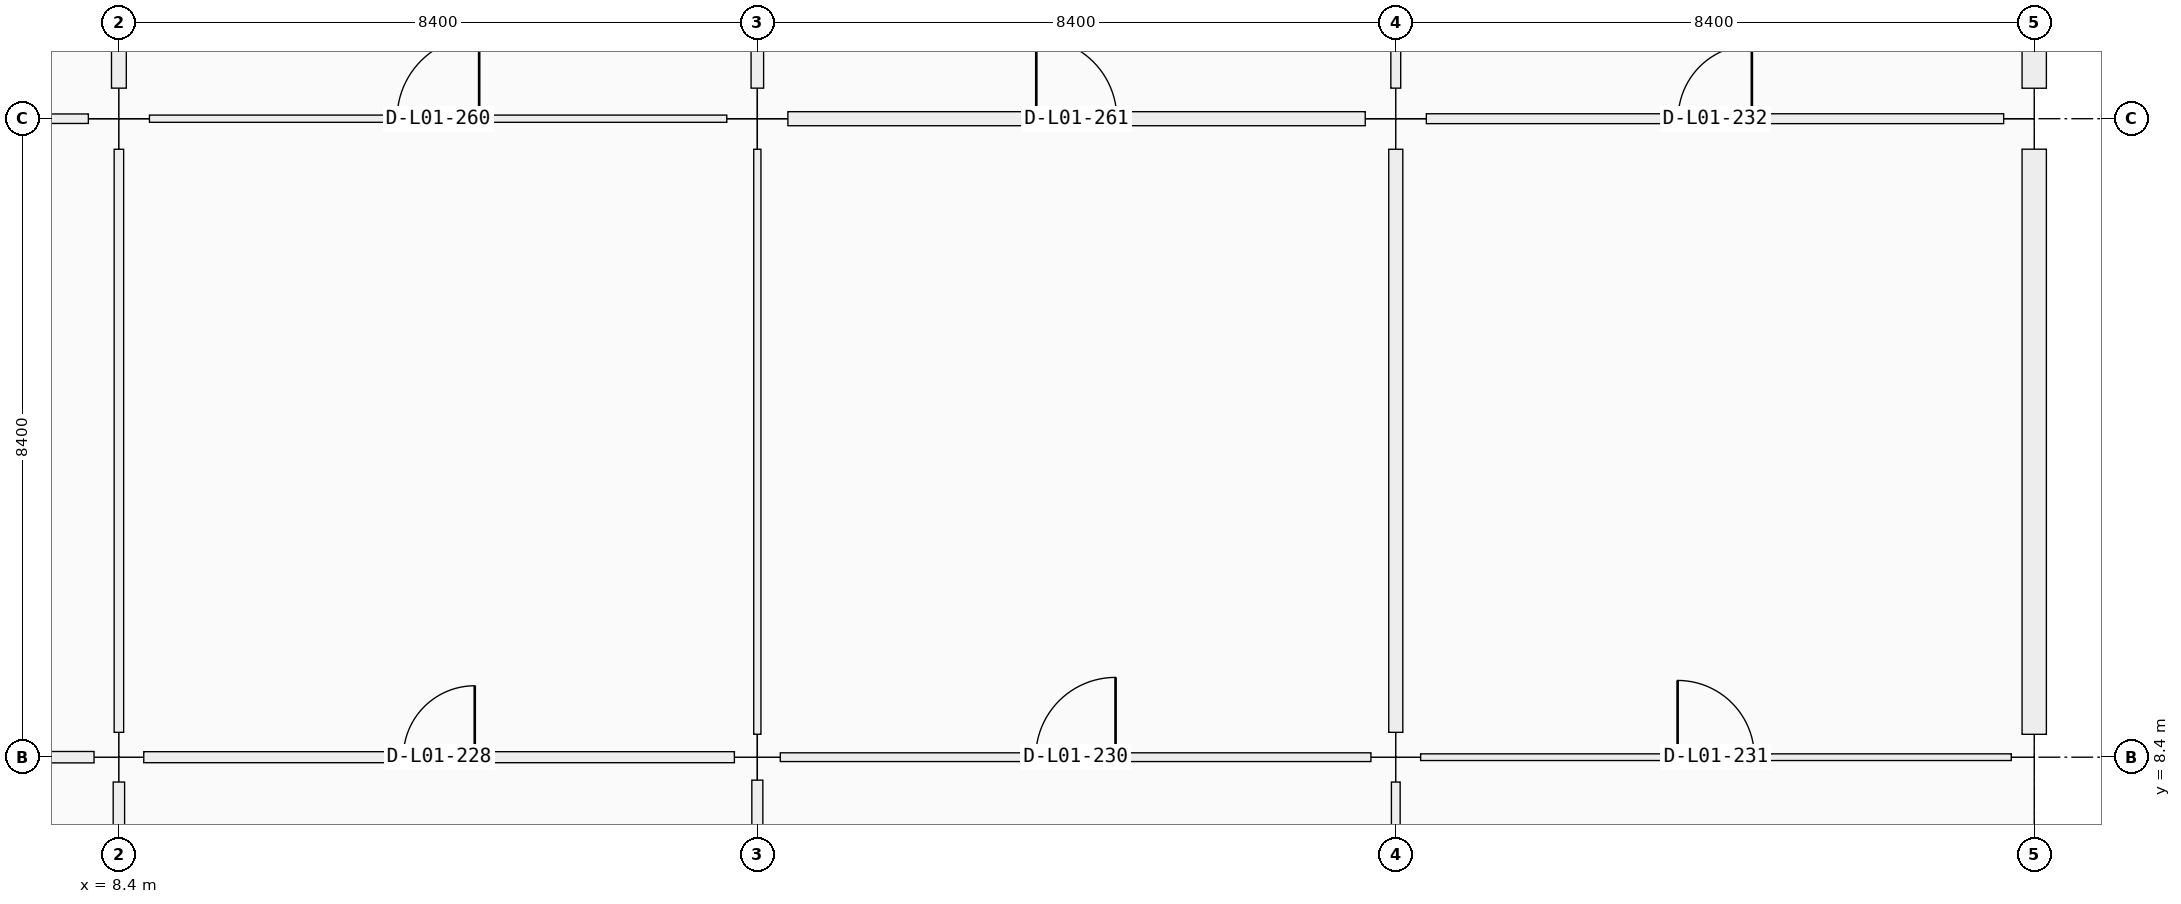
"""IFC4 building model, lengths in metres.
Left out: names, types, materials, properties, quantities, classifications, styles, units other than length and angle.
Written with IfcOpenShell. Run it as: python <this file> out.ifc"""

import sys

from ifc_helpers import new_model, si_unit, direction, frame, frame_2d, origin, origin_2d, place, context, subcontext, project, spatial, rectangle, extrude, element, fill, save


model = new_model("IFC4")
c1 = context("Model", 3, precision=1e-05, world=origin(), true_north=direction((0.0, 1.0)))
c2 = subcontext(c1, "Body", "Model", "MODEL_VIEW")
j1 = project(units=[si_unit("LENGTHUNIT", "METRE"), si_unit("PLANEANGLEUNIT", "RADIAN")], contexts=[c1])
p1 = place(None, origin())
s1 = spatial("IfcSite", under=j1, at=p1, CompositionType="ELEMENT")
p2 = place(p1, origin())
s2 = spatial("IfcBuilding", under=s1, at=p2, CompositionType="ELEMENT")
p3 = place(p2, frame((0.0, 0.0, 5.76)))
s3 = spatial("IfcBuildingStorey", under=s2, at=p3, CompositionType="ELEMENT", Elevation=5.76)
p4 = place(p3, frame((8.4, 8.4, 0.0), z_axis=(0.0, 0.0, 1.0), x_axis=(1.0, 0.0, 0.0)))
e1 = element("IfcColumn", 1, at=p4, inside=s3, PredefinedType="COLUMN", context=c2, shape_type="SweptSolid", body=[
    extrude(rectangle(XDim=0.65, YDim=0.65, at=origin_2d()), origin(), (0.0, 0.0, 1.0), 4.5),
])
p5 = place(p3, frame((8.4, 16.8, 0.0), z_axis=(0.0, 0.0, 1.0), x_axis=(1.0, 0.0, 0.0)))
e2 = element("IfcColumn", 2, at=p5, inside=s3, PredefinedType="COLUMN", context=c2, shape_type="SweptSolid", body=[
    extrude(rectangle(XDim=0.8, YDim=0.8, at=origin_2d()), origin(), (0.0, 0.0, 1.0), 4.5),
])
p6 = place(p3, frame((16.8, 8.4, 0.0), z_axis=(0.0, 0.0, 1.0), x_axis=(1.0, 0.0, 0.0)))
e3 = element("IfcColumn", 3, at=p6, inside=s3, PredefinedType="COLUMN", context=c2, shape_type="SweptSolid", body=[
    extrude(rectangle(XDim=0.6, YDim=0.6, at=origin_2d()), origin(), (0.0, 0.0, 1.0), 4.5),
])
p7 = place(p3, frame((16.8, 16.8, 0.0), z_axis=(0.0, 0.0, 1.0), x_axis=(1.0, 0.0, 0.0)))
e4 = element("IfcColumn", 4, at=p7, inside=s3, PredefinedType="COLUMN", context=c2, shape_type="SweptSolid", body=[
    extrude(rectangle(XDim=0.8, YDim=0.8, at=origin_2d()), origin(), (0.0, 0.0, 1.0), 4.5),
])
p8 = place(p3, frame((25.2, 8.4, 0.0), z_axis=(0.0, 0.0, 1.0), x_axis=(1.0, 0.0, 0.0)))
e5 = element("IfcColumn", 5, at=p8, inside=s3, PredefinedType="COLUMN", context=c2, shape_type="SweptSolid", body=[
    extrude(rectangle(XDim=0.65, YDim=0.65, at=origin_2d()), origin(), (0.0, 0.0, 1.0), 4.5),
])
p9 = place(p3, frame((25.2, 16.8, 0.0), z_axis=(0.0, 0.0, 1.0), x_axis=(1.0, 0.0, 0.0)))
e6 = element("IfcColumn", 6, at=p9, inside=s3, PredefinedType="COLUMN", context=c2, shape_type="SweptSolid", body=[
    extrude(rectangle(XDim=0.8, YDim=0.8, at=origin_2d()), origin(), (0.0, 0.0, 1.0), 4.5),
])
p10 = place(p3, frame((33.6, 8.4, 0.0), z_axis=(0.0, 0.0, 1.0), x_axis=(1.0, 0.0, 0.0)))
e7 = element("IfcColumn", 7, at=p10, inside=s3, PredefinedType="COLUMN", context=c2, shape_type="SweptSolid", body=[
    extrude(rectangle(XDim=0.6, YDim=0.6, at=origin_2d()), origin(), (0.0, 0.0, 1.0), 4.5),
])
p11 = place(p3, frame((33.6, 16.8, 0.0), z_axis=(0.0, 0.0, 1.0), x_axis=(1.0, 0.0, 0.0)))
e8 = element("IfcColumn", 8, at=p11, inside=s3, PredefinedType="COLUMN", context=c2, shape_type="SweptSolid", body=[
    extrude(rectangle(XDim=0.8, YDim=0.8, at=origin_2d()), origin(), (0.0, 0.0, 1.0), 4.5),
])
p12 = place(p3, frame((33.6, 16.399, 0.0), z_axis=(0.0, 0.0, 1.0), x_axis=(0.0, -1.0, 0.0)))
e9 = element("IfcWall", 9, at=p12, inside=s3, PredefinedType="SOLIDWALL", context=c2, shape_type="SweptSolid", body=[
    extrude(rectangle(XDim=7.698, YDim=0.32, at=frame_2d((3.849, 0.0))), origin(), (0.0, 0.0, 1.0), 3.4),
])
p13 = place(p12, frame((2.699, 0.0, 0.9)))
e10 = element("IfcOpeningElement", 10, at=p13, cuts=e9, PredefinedType="OPENING", context=c2, shape_type="SweptSolid", body=[
    extrude(rectangle(XDim=2.3, YDim=1.85, at=frame_2d((1.15, 0.925))), frame((0.0, 0.16, 0.0), z_axis=(0.0, -1.0, 0.0), x_axis=(1.0, 0.0, 0.0)), (0.0, 0.0, 1.0), 0.32),
])
p14 = place(p3, frame((33.6, 24.799, 0.0), z_axis=(0.0, 0.0, 1.0), x_axis=(0.0, -1.0, 0.0)))
e11 = element("IfcWall", 11, at=p14, inside=s3, PredefinedType="SOLIDWALL", context=c2, shape_type="SweptSolid", body=[
    extrude(rectangle(XDim=7.598, YDim=0.32, at=frame_2d((3.799, 0.0))), origin(), (0.0, 0.0, 1.0), 3.4),
])
p15 = place(p14, frame((2.349, 0.0, 0.9)))
e12 = element("IfcOpeningElement", 12, at=p15, cuts=e11, PredefinedType="OPENING", context=c2, shape_type="SweptSolid", body=[
    extrude(rectangle(XDim=2.9, YDim=1.85, at=frame_2d((1.45, 0.925))), frame((0.0, 0.16, 0.0), z_axis=(0.0, -1.0, 0.0), x_axis=(1.0, 0.0, 0.0)), (0.0, 0.0, 1.0), 0.32),
])
p16 = place(p3, frame((0.277, 8.4, 0.0), z_axis=(0.0, 0.0, 1.0), x_axis=(1.0, 0.0, 0.0)))
e13 = element("IfcWall", 13, at=p16, inside=s3, PredefinedType="MOVABLE", context=c2, shape_type="SweptSolid", body=[
    extrude(rectangle(XDim=7.796, YDim=0.15, at=frame_2d((3.898, 0.0))), origin(), (0.0, 0.0, 1.0), 2.4),
])
p17 = place(p16, frame((3.358, 0.0, 0.0)))
e14 = element("IfcOpeningElement", 14, at=p17, cuts=e13, PredefinedType="OPENING", context=c2, shape_type="SweptSolid", body=[
    extrude(rectangle(XDim=1.08, YDim=2.22, at=frame_2d((0.54, 1.11))), frame((0.0, 0.075, 0.0), z_axis=(0.0, -1.0, 0.0), x_axis=(1.0, 0.0, 0.0)), (0.0, 0.0, 1.0), 0.15),
])
p18 = place(p3, frame((0.277, 16.8, 0.0), z_axis=(0.0, 0.0, 1.0), x_axis=(1.0, 0.0, 0.0)))
e15 = element("IfcWall", 15, at=p18, inside=s3, PredefinedType="PARTITIONING", context=c2, shape_type="SweptSolid", body=[
    extrude(rectangle(XDim=7.721, YDim=0.125, at=frame_2d((3.86, 0.0))), origin(), (0.0, 0.0, 1.0), 2.4),
])
p19 = place(p18, frame((3.33, 0.0, 0.0)))
e16 = element("IfcOpeningElement", 16, at=p19, cuts=e15, PredefinedType="OPENING", context=c2, shape_type="SweptSolid", body=[
    extrude(rectangle(XDim=1.06, YDim=2.22, at=frame_2d((0.53, 1.11))), frame((0.0, 0.062, 0.0), z_axis=(0.0, -1.0, 0.0), x_axis=(1.0, 0.0, 0.0)), (0.0, 0.0, 1.0), 0.125),
])
p20 = place(p3, frame((8.727, 8.4, 0.0), z_axis=(0.0, 0.0, 1.0), x_axis=(1.0, 0.0, 0.0)))
e17 = element("IfcWall", 17, at=p20, inside=s3, PredefinedType="PARTITIONING", context=c2, shape_type="SweptSolid", body=[
    extrude(rectangle(XDim=7.771, YDim=0.145, at=frame_2d((3.885, 0.0))), origin(), (0.0, 0.0, 1.0), 2.4),
])
p21 = place(p20, frame((3.415, 0.0, 0.0)))
e18 = element("IfcOpeningElement", 18, at=p21, cuts=e17, PredefinedType="OPENING", context=c2, shape_type="SweptSolid", body=[
    extrude(rectangle(XDim=0.94, YDim=2.15, at=frame_2d((0.47, 1.075))), frame((0.0, 0.073, 0.0), z_axis=(0.0, -1.0, 0.0), x_axis=(1.0, 0.0, 0.0)), (0.0, 0.0, 1.0), 0.145),
])
p22 = place(p3, frame((8.802, 16.8, 0.0), z_axis=(0.0, 0.0, 1.0), x_axis=(1.0, 0.0, 0.0)))
e19 = element("IfcWall", 19, at=p22, inside=s3, PredefinedType="PARTITIONING", context=c2, shape_type="SweptSolid", body=[
    extrude(rectangle(XDim=7.596, YDim=0.095, at=frame_2d((3.798, 0.0))), origin(), (0.0, 0.0, 1.0), 2.4),
])
p23 = place(p22, frame((3.258, 0.0, 0.0)))
e20 = element("IfcOpeningElement", 20, at=p23, cuts=e19, PredefinedType="OPENING", context=c2, shape_type="SweptSolid", body=[
    extrude(rectangle(XDim=1.08, YDim=2.22, at=frame_2d((0.54, 1.11))), frame((0.0, 0.047, 0.0), z_axis=(0.0, -1.0, 0.0), x_axis=(1.0, 0.0, 0.0)), (0.0, 0.0, 1.0), 0.095),
])
p24 = place(p3, frame((17.102, 8.4, 0.0), z_axis=(0.0, 0.0, 1.0), x_axis=(1.0, 0.0, 0.0)))
e21 = element("IfcWall", 21, at=p24, inside=s3, PredefinedType="PARTITIONING", context=c2, shape_type="SweptSolid", body=[
    extrude(rectangle(XDim=7.771, YDim=0.115, at=frame_2d((3.885, 0.0))), origin(), (0.0, 0.0, 1.0), 2.4),
])
p25 = place(p24, frame((3.361, 0.0, 0.0)))
e22 = element("IfcOpeningElement", 22, at=p25, cuts=e21, PredefinedType="OPENING", context=c2, shape_type="SweptSolid", body=[
    extrude(rectangle(XDim=1.05, YDim=2.12, at=frame_2d((0.525, 1.06))), frame((0.0, 0.058, 0.0), z_axis=(0.0, -1.0, 0.0), x_axis=(1.0, 0.0, 0.0)), (0.0, 0.0, 1.0), 0.115),
])
p26 = place(p3, frame((17.202, 16.8, 0.0), z_axis=(0.0, 0.0, 1.0), x_axis=(1.0, 0.0, 0.0)))
e23 = element("IfcWall", 23, at=p26, inside=s3, PredefinedType="PARTITIONING", context=c2, shape_type="SweptSolid", body=[
    extrude(rectangle(XDim=7.596, YDim=0.185, at=frame_2d((3.798, 0.0))), origin(), (0.0, 0.0, 1.0), 2.4),
])
p27 = place(p26, frame((3.268, 0.0, 0.0)))
e24 = element("IfcOpeningElement", 24, at=p27, cuts=e23, PredefinedType="OPENING", context=c2, shape_type="SweptSolid", body=[
    extrude(rectangle(XDim=1.06, YDim=2.22, at=frame_2d((0.53, 1.11))), frame((0.0, 0.093, 0.0), z_axis=(0.0, -1.0, 0.0), x_axis=(1.0, 0.0, 0.0)), (0.0, 0.0, 1.0), 0.185),
])
p28 = place(p3, frame((25.527, 8.4, 0.0), z_axis=(0.0, 0.0, 1.0), x_axis=(1.0, 0.0, 0.0)))
e25 = element("IfcWall", 25, at=p28, inside=s3, PredefinedType="PARTITIONING", context=c2, shape_type="SweptSolid", body=[
    extrude(rectangle(XDim=7.771, YDim=0.088, at=frame_2d((3.885, 0.0))), origin(), (0.0, 0.0, 1.0), 2.4),
])
p29 = place(p28, frame((3.381, 0.0, 0.0)))
e26 = element("IfcOpeningElement", 26, at=p29, cuts=e25, PredefinedType="OPENING", context=c2, shape_type="SweptSolid", body=[
    extrude(rectangle(XDim=1.01, YDim=2.12, at=frame_2d((0.505, 1.06))), frame((0.0, 0.044, 0.0), z_axis=(0.0, -1.0, 0.0), x_axis=(1.0, 0.0, 0.0)), (0.0, 0.0, 1.0), 0.088),
])
p30 = place(p3, frame((25.602, 16.8, 0.0), z_axis=(0.0, 0.0, 1.0), x_axis=(1.0, 0.0, 0.0)))
e27 = element("IfcWall", 27, at=p30, inside=s3, PredefinedType="MOVABLE", context=c2, shape_type="SweptSolid", body=[
    extrude(rectangle(XDim=7.596, YDim=0.13, at=frame_2d((3.798, 0.0))), origin(), (0.0, 0.0, 1.0), 2.4),
])
p31 = place(p30, frame((3.313, 0.0, 0.0)))
e28 = element("IfcOpeningElement", 28, at=p31, cuts=e27, PredefinedType="OPENING", context=c2, shape_type="SweptSolid", body=[
    extrude(rectangle(XDim=0.97, YDim=2.12, at=frame_2d((0.485, 1.06))), frame((0.0, 0.065, 0.0), z_axis=(0.0, -1.0, 0.0), x_axis=(1.0, 0.0, 0.0)), (0.0, 0.0, 1.0), 0.13),
])
p32 = place(p3, frame((8.4, 0.277, 0.0), z_axis=(0.0, 0.0, 1.0), x_axis=(0.0, 1.0, 0.0)))
e29 = element("IfcWall", 29, at=p32, inside=s3, PredefinedType="MOVABLE", context=c2, shape_type="SweptSolid", body=[
    extrude(rectangle(XDim=7.796, YDim=0.15, at=frame_2d((3.898, 0.0))), origin(), (0.0, 0.0, 1.0), 2.4),
])
p33 = place(p32, frame((3.388, 0.0, 0.0)))
e30 = element("IfcOpeningElement", 30, at=p33, cuts=e29, PredefinedType="OPENING", context=c2, shape_type="SweptSolid", body=[
    extrude(rectangle(XDim=1.02, YDim=2.2, at=frame_2d((0.51, 1.1))), frame((0.0, 0.075, 0.0), z_axis=(0.0, -1.0, 0.0), x_axis=(1.0, 0.0, 0.0)), (0.0, 0.0, 1.0), 0.15),
])
p34 = place(p3, frame((8.4, 8.727, 0.0), z_axis=(0.0, 0.0, 1.0), x_axis=(0.0, 1.0, 0.0)))
e31 = element("IfcWall", 31, at=p34, inside=s3, PredefinedType="PARTITIONING", context=c2, shape_type="SweptSolid", body=[
    extrude(rectangle(XDim=7.671, YDim=0.125, at=frame_2d((3.835, 0.0))), origin(), (0.0, 0.0, 1.0), 2.4),
])
p35 = place(p34, frame((3.336, 0.0, 0.0)))
e32 = element("IfcOpeningElement", 32, at=p35, cuts=e31, PredefinedType="OPENING", context=c2, shape_type="SweptSolid", body=[
    extrude(rectangle(XDim=1.0, YDim=2.2, at=frame_2d((0.5, 1.1))), frame((0.0, 0.062, 0.0), z_axis=(0.0, -1.0, 0.0), x_axis=(1.0, 0.0, 0.0)), (0.0, 0.0, 1.0), 0.125),
])
p36 = place(p3, frame((8.4, 17.202, 0.0), z_axis=(0.0, 0.0, 1.0), x_axis=(0.0, 1.0, 0.0)))
e33 = element("IfcWall", 33, at=p36, inside=s3, PredefinedType="PARTITIONING", context=c2, shape_type="SweptSolid", body=[
    extrude(rectangle(XDim=7.596, YDim=0.195, at=frame_2d((3.798, 0.0))), origin(), (0.0, 0.0, 1.0), 2.4),
])
p37 = place(p36, frame((3.308, 0.0, 0.0)))
e34 = element("IfcOpeningElement", 34, at=p37, cuts=e33, PredefinedType="OPENING", context=c2, shape_type="SweptSolid", body=[
    extrude(rectangle(XDim=0.98, YDim=2.18, at=frame_2d((0.49, 1.09))), frame((0.0, 0.098, 0.0), z_axis=(0.0, -1.0, 0.0), x_axis=(1.0, 0.0, 0.0)), (0.0, 0.0, 1.0), 0.195),
])
p38 = place(p3, frame((16.8, 0.277, 0.0), z_axis=(0.0, 0.0, 1.0), x_axis=(0.0, 1.0, 0.0)))
e35 = element("IfcWall", 35, at=p38, inside=s3, PredefinedType="PARTITIONING", context=c2, shape_type="SweptSolid", body=[
    extrude(rectangle(XDim=7.821, YDim=0.145, at=frame_2d((3.91, 0.0))), origin(), (0.0, 0.0, 1.0), 2.4),
])
p39 = place(p38, frame((3.45, 0.0, 0.0)))
e36 = element("IfcOpeningElement", 36, at=p39, cuts=e35, PredefinedType="OPENING", context=c2, shape_type="SweptSolid", body=[
    extrude(rectangle(XDim=0.92, YDim=2.15, at=frame_2d((0.46, 1.075))), frame((0.0, 0.073, 0.0), z_axis=(0.0, -1.0, 0.0), x_axis=(1.0, 0.0, 0.0)), (0.0, 0.0, 1.0), 0.145),
])
p40 = place(p3, frame((16.8, 8.702, 0.0), z_axis=(0.0, 0.0, 1.0), x_axis=(0.0, 1.0, 0.0)))
e37 = element("IfcWall", 37, at=p40, inside=s3, PredefinedType="PARTITIONING", context=c2, shape_type="SweptSolid", body=[
    extrude(rectangle(XDim=7.696, YDim=0.095, at=frame_2d((3.848, 0.0))), origin(), (0.0, 0.0, 1.0), 2.4),
])
p41 = place(p40, frame((3.323, 0.0, 0.0)))
e38 = element("IfcOpeningElement", 38, at=p41, cuts=e37, PredefinedType="OPENING", context=c2, shape_type="SweptSolid", body=[
    extrude(rectangle(XDim=1.05, YDim=2.12, at=frame_2d((0.525, 1.06))), frame((0.0, 0.047, 0.0), z_axis=(0.0, -1.0, 0.0), x_axis=(1.0, 0.0, 0.0)), (0.0, 0.0, 1.0), 0.095),
])
p42 = place(p3, frame((16.8, 17.202, 0.0), z_axis=(0.0, 0.0, 1.0), x_axis=(0.0, 1.0, 0.0)))
e39 = element("IfcWall", 39, at=p42, inside=s3, PredefinedType="PARTITIONING", context=c2, shape_type="SweptSolid", body=[
    extrude(rectangle(XDim=7.596, YDim=0.165, at=frame_2d((3.798, 0.0))), origin(), (0.0, 0.0, 1.0), 2.4),
])
p43 = place(p42, frame((3.293, 0.0, 0.0)))
e40 = element("IfcOpeningElement", 40, at=p43, cuts=e39, PredefinedType="OPENING", context=c2, shape_type="SweptSolid", body=[
    extrude(rectangle(XDim=1.01, YDim=2.12, at=frame_2d((0.505, 1.06))), frame((0.0, 0.083, 0.0), z_axis=(0.0, -1.0, 0.0), x_axis=(1.0, 0.0, 0.0)), (0.0, 0.0, 1.0), 0.165),
])
p44 = place(p3, frame((25.2, 0.277, 0.0), z_axis=(0.0, 0.0, 1.0), x_axis=(0.0, 1.0, 0.0)))
e41 = element("IfcWall", 41, at=p44, inside=s3, PredefinedType="PARTITIONING", context=c2, shape_type="SweptSolid", body=[
    extrude(rectangle(XDim=7.796, YDim=0.115, at=frame_2d((3.898, 0.0))), origin(), (0.0, 0.0, 1.0), 2.4),
])
p45 = place(p44, frame((3.358, 0.0, 0.0)))
e42 = element("IfcOpeningElement", 42, at=p45, cuts=e41, PredefinedType="OPENING", context=c2, shape_type="SweptSolid", body=[
    extrude(rectangle(XDim=1.08, YDim=2.22, at=frame_2d((0.54, 1.11))), frame((0.0, 0.058, 0.0), z_axis=(0.0, -1.0, 0.0), x_axis=(1.0, 0.0, 0.0)), (0.0, 0.0, 1.0), 0.115),
])
p46 = place(p3, frame((25.2, 8.727, 0.0), z_axis=(0.0, 0.0, 1.0), x_axis=(0.0, 1.0, 0.0)))
e43 = element("IfcWall", 43, at=p46, inside=s3, PredefinedType="PARTITIONING", context=c2, shape_type="SweptSolid", body=[
    extrude(rectangle(XDim=7.671, YDim=0.185, at=frame_2d((3.835, 0.0))), origin(), (0.0, 0.0, 1.0), 2.4),
])
p47 = place(p46, frame((3.306, 0.0, 0.0)))
e44 = element("IfcOpeningElement", 44, at=p47, cuts=e43, PredefinedType="OPENING", context=c2, shape_type="SweptSolid", body=[
    extrude(rectangle(XDim=1.06, YDim=2.22, at=frame_2d((0.53, 1.11))), frame((0.0, 0.093, 0.0), z_axis=(0.0, -1.0, 0.0), x_axis=(1.0, 0.0, 0.0)), (0.0, 0.0, 1.0), 0.185),
])
p48 = place(p3, frame((25.2, 17.202, 0.0), z_axis=(0.0, 0.0, 1.0), x_axis=(0.0, 1.0, 0.0)))
e45 = element("IfcWall", 45, at=p48, inside=s3, PredefinedType="MOVABLE", context=c2, shape_type="SweptSolid", body=[
    extrude(rectangle(XDim=7.596, YDim=0.13, at=frame_2d((3.798, 0.0))), origin(), (0.0, 0.0, 1.0), 2.4),
])
p49 = place(p48, frame((3.278, 0.0, 0.0)))
e46 = element("IfcOpeningElement", 46, at=p49, cuts=e45, PredefinedType="OPENING", context=c2, shape_type="SweptSolid", body=[
    extrude(rectangle(XDim=1.04, YDim=2.2, at=frame_2d((0.52, 1.1))), frame((0.0, 0.065, 0.0), z_axis=(0.0, -1.0, 0.0), x_axis=(1.0, 0.0, 0.0)), (0.0, 0.0, 1.0), 0.13),
])
p50 = place(p13, origin())
e47 = element("IfcWindow", 47, at=p50, inside=s3, PartitioningType="SINGLE_PANEL", PredefinedType="WINDOW", context=c2, shape_type="SweptSolid", body=[
    extrude(rectangle(XDim=2.3, YDim=1.85, at=frame_2d((1.15, 0.925))), frame((0.0, 0.03, 0.0), z_axis=(0.0, -1.0, 0.0), x_axis=(1.0, 0.0, 0.0)), (0.0, 0.0, 1.0), 0.06),
])
fill(e10, e47)
p51 = place(p21, origin())
e48 = element("IfcDoor", 48, at=p51, inside=s3, OperationType="SINGLE_SWING_RIGHT", PredefinedType="DOOR", context=c2, shape_type="SweptSolid", body=[
    extrude(rectangle(XDim=0.94, YDim=2.15, at=frame_2d((0.47, 1.075))), frame((0.0, 0.025, 0.0), z_axis=(0.0, -1.0, 0.0), x_axis=(1.0, 0.0, 0.0)), (0.0, 0.0, 1.0), 0.05),
])
fill(e18, e48)
p52 = place(p25, origin())
e49 = element("IfcDoor", 49, at=p52, inside=s3, OperationType="SINGLE_SWING_RIGHT", PredefinedType="DOOR", context=c2, shape_type="SweptSolid", body=[
    extrude(rectangle(XDim=1.05, YDim=2.12, at=frame_2d((0.525, 1.06))), frame((0.0, 0.025, 0.0), z_axis=(0.0, -1.0, 0.0), x_axis=(1.0, 0.0, 0.0)), (0.0, 0.0, 1.0), 0.05),
])
fill(e22, e49)
p53 = place(p29, origin())
e50 = element("IfcDoor", 50, at=p53, inside=s3, OperationType="SINGLE_SWING_LEFT", PredefinedType="DOOR", context=c2, shape_type="SweptSolid", body=[
    extrude(rectangle(XDim=1.01, YDim=2.12, at=frame_2d((0.505, 1.06))), frame((0.0, 0.025, 0.0), z_axis=(0.0, -1.0, 0.0), x_axis=(1.0, 0.0, 0.0)), (0.0, 0.0, 1.0), 0.05),
])
fill(e26, e50)
p54 = place(p31, origin())
e51 = element("IfcDoor", 51, at=p54, inside=s3, OperationType="SINGLE_SWING_RIGHT", PredefinedType="DOOR", context=c2, shape_type="SweptSolid", body=[
    extrude(rectangle(XDim=0.97, YDim=2.12, at=frame_2d((0.485, 1.06))), frame((0.0, 0.025, 0.0), z_axis=(0.0, -1.0, 0.0), x_axis=(1.0, 0.0, 0.0)), (0.0, 0.0, 1.0), 0.05),
])
fill(e28, e51)
p55 = place(p23, origin())
e52 = element("IfcDoor", 52, at=p55, inside=s3, OperationType="SINGLE_SWING_RIGHT", PredefinedType="DOOR", context=c2, shape_type="SweptSolid", body=[
    extrude(rectangle(XDim=1.08, YDim=2.22, at=frame_2d((0.54, 1.11))), frame((0.0, 0.025, 0.0), z_axis=(0.0, -1.0, 0.0), x_axis=(1.0, 0.0, 0.0)), (0.0, 0.0, 1.0), 0.05),
])
fill(e20, e52)
p56 = place(p27, origin())
e53 = element("IfcDoor", 53, at=p56, inside=s3, OperationType="SINGLE_SWING_LEFT", PredefinedType="DOOR", context=c2, shape_type="SweptSolid", body=[
    extrude(rectangle(XDim=1.06, YDim=2.22, at=frame_2d((0.53, 1.11))), frame((0.0, 0.025, 0.0), z_axis=(0.0, -1.0, 0.0), x_axis=(1.0, 0.0, 0.0)), (0.0, 0.0, 1.0), 0.05),
])
fill(e24, e53)
p57 = place(p35, origin())
e54 = element("IfcDoor", 54, at=p57, inside=s3, OperationType="SINGLE_SWING_LEFT", PredefinedType="DOOR", context=c2, shape_type="SweptSolid", body=[
    extrude(rectangle(XDim=1.0, YDim=2.2, at=frame_2d((0.5, 1.1))), frame((0.0, 0.025, 0.0), z_axis=(0.0, -1.0, 0.0), x_axis=(1.0, 0.0, 0.0)), (0.0, 0.0, 1.0), 0.05),
])
fill(e32, e54)
p58 = place(p41, origin())
e55 = element("IfcDoor", 55, at=p58, inside=s3, OperationType="SINGLE_SWING_RIGHT", PredefinedType="DOOR", context=c2, shape_type="SweptSolid", body=[
    extrude(rectangle(XDim=1.05, YDim=2.12, at=frame_2d((0.525, 1.06))), frame((0.0, 0.025, 0.0), z_axis=(0.0, -1.0, 0.0), x_axis=(1.0, 0.0, 0.0)), (0.0, 0.0, 1.0), 0.05),
])
fill(e38, e55)
p59 = place(p47, origin())
e56 = element("IfcDoor", 56, at=p59, inside=s3, OperationType="SINGLE_SWING_LEFT", PredefinedType="DOOR", context=c2, shape_type="SweptSolid", body=[
    extrude(rectangle(XDim=1.06, YDim=2.22, at=frame_2d((0.53, 1.11))), frame((0.0, 0.025, 0.0), z_axis=(0.0, -1.0, 0.0), x_axis=(1.0, 0.0, 0.0)), (0.0, 0.0, 1.0), 0.05),
])
fill(e44, e56)
save(model, sys.argv[1])
